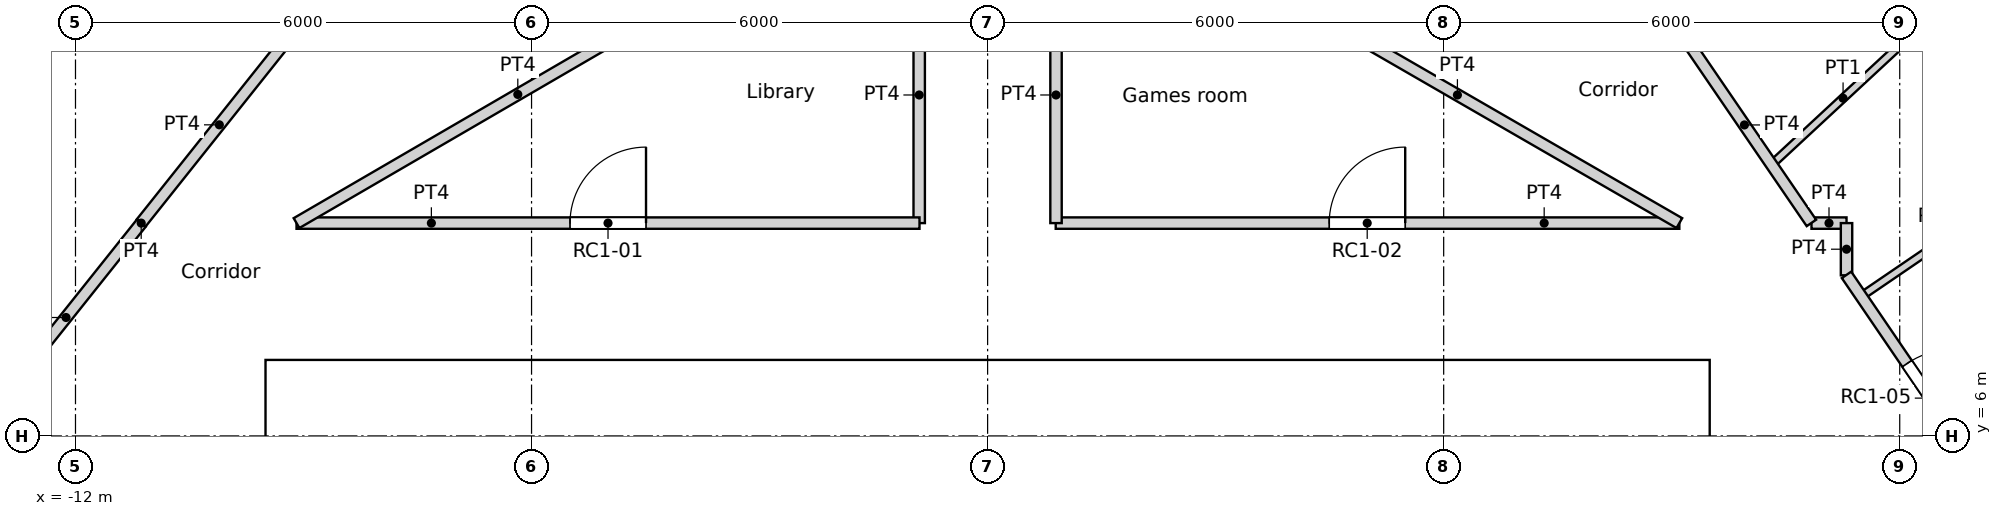
"""IFC4 building model, lengths in metres.
Left out: names, types, materials, properties, quantities, classifications, styles, units other than length and angle.
Written with IfcOpenShell. Run it as: python <this file> out.ifc"""

import sys

from ifc_helpers import new_model, si_unit, direction, frame, frame_2d, origin, place, context, subcontext, project, spatial, rectangle, extrude, element, fill, save


model = new_model("IFC4")
c1 = context("Model", 3, precision=1e-05, world=origin(), true_north=direction((0.0, 1.0)))
c2 = subcontext(c1, "Body", "Model", "MODEL_VIEW")
j1 = project(units=[si_unit("LENGTHUNIT", "METRE"), si_unit("PLANEANGLEUNIT", "RADIAN")], contexts=[c1])
p1 = place(None, origin())
s1 = spatial("IfcSite", under=j1, at=p1, CompositionType="ELEMENT")
p2 = place(p1, origin())
s2 = spatial("IfcBuilding", under=s1, at=p2, CompositionType="ELEMENT")
p3 = place(p2, frame((0.0, 0.0, 231.0)))
s3 = spatial("IfcBuildingStorey", under=s2, at=p3, CompositionType="ELEMENT", Elevation=231.0)
p4 = place(p3, frame((-9.5, 6.7, 0.0), z_axis=(0.0, 0.0, 1.0), x_axis=(1.0, 0.0, 0.0)))
e1 = element("IfcWall", 1, at=p4, inside=s3, PredefinedType="SOLIDWALL", context=c2, shape_type="SweptSolid", body=[
    extrude(rectangle(XDim=19.0, YDim=0.6, at=frame_2d((9.5, 0.0))), origin(), (0.0, 0.0, 1.0), 3.6),
])
p5 = place(p4, frame((5.35, 0.0, 0.0)))
e2 = element("IfcOpeningElement", 2, at=p5, cuts=e1, PredefinedType="OPENING", context=c2, shape_type="SweptSolid", body=[
    extrude(rectangle(XDim=1.7, YDim=2.1, at=frame_2d((0.85, 1.05))), frame((0.0, 0.3, 0.0), z_axis=(0.0, -1.0, 0.0), x_axis=(1.0, 0.0, 0.0)), (0.0, 0.0, 1.0), 0.6),
])
p6 = place(p3, frame((-9.2, -6.4, 0.0), z_axis=(0.0, 0.0, 1.0), x_axis=(0.0, 1.0, 0.0)))
e3 = element("IfcWall", 3, at=p6, inside=s3, PredefinedType="SOLIDWALL", context=c2, shape_type="SweptSolid", body=[
    extrude(rectangle(XDim=12.8, YDim=0.6, at=frame_2d((6.4, 0.0))), origin(), (0.0, 0.0, 1.0), 3.6),
])
p7 = place(p3, frame((9.2, -6.4, 0.0), z_axis=(0.0, 0.0, 1.0), x_axis=(0.0, 1.0, 0.0)))
e4 = element("IfcWall", 4, at=p7, inside=s3, PredefinedType="SOLIDWALL", context=c2, shape_type="SweptSolid", body=[
    extrude(rectangle(XDim=12.8, YDim=0.6, at=frame_2d((6.4, 0.0))), origin(), (0.0, 0.0, 1.0), 3.6),
])
p8 = place(p7, frame((6.4, 0.0, 0.0)))
e5 = element("IfcOpeningElement", 5, at=p8, cuts=e4, PredefinedType="OPENING", context=c2, shape_type="SweptSolid", body=[
    extrude(rectangle(XDim=1.8, YDim=2.1, at=frame_2d((0.9, 1.05))), frame((0.0, 0.3, 0.0), z_axis=(0.0, -1.0, 0.0), x_axis=(1.0, 0.0, 0.0)), (0.0, 0.0, 1.0), 0.6),
])
for number, where, z_axis, x_axis in (
    (6, (-2.25, 3.25, 0.0), (0.0, 0.0, 1.0), (0.0, 1.0, 0.0)),
    (7, (0.55, 3.25, 0.0), (0.0, 0.0, 1.0), (0.0, 1.0, 0.0)),
    (8, (3.35, 3.25, 0.0), (0.0, 0.0, 1.0), (0.0, 1.0, 0.0)),
    (9, (6.15, 3.25, 0.0), (0.0, 0.0, 1.0), (0.0, 1.0, 0.0)),
):
    element("IfcWall", number, at=place(p3, frame(where, z_axis=z_axis, x_axis=x_axis)), inside=s3, PredefinedType="SOLIDWALL", context=c2, shape_type="SweptSolid", body=[
        extrude(rectangle(XDim=3.15, YDim=0.3, at=frame_2d((1.575, 0.0))), origin(), (0.0, 0.0, 1.0), 3.25),
    ])
p9 = place(p3, frame((-9.092, 8.8, 0.0), z_axis=(0.0, 0.0, 1.0), x_axis=(0.864470922103, 0.502682827277, 0.0)))
e10 = element("IfcWall", 10, at=p9, inside=s3, PredefinedType="PARTITIONING", context=c2, shape_type="SweptSolid", body=[
    extrude(rectangle(XDim=6.735, YDim=0.15, at=frame_2d((3.368, 0.0))), origin(), (0.0, 0.0, 1.0), 3.25),
])
p10 = place(p3, frame((-9.092, 8.8, 0.0), z_axis=(0.0, 0.0, 1.0), x_axis=(1.0, 0.0, 0.0)))
e11 = element("IfcWall", 11, at=p10, inside=s3, PredefinedType="PARTITIONING", context=c2, shape_type="SweptSolid", body=[
    extrude(rectangle(XDim=8.196, YDim=0.15, at=frame_2d((4.098, 0.0))), origin(), (0.0, 0.0, 1.0), 3.25),
])
p11 = place(p10, frame((3.598, 0.0, 0.0)))
e12 = element("IfcOpeningElement", 12, at=p11, cuts=e11, PredefinedType="OPENING", context=c2, shape_type="SweptSolid", body=[
    extrude(rectangle(XDim=1.0, YDim=2.04, at=frame_2d((0.5, 1.02))), frame((0.0, 0.075, 0.0), z_axis=(0.0, -1.0, 0.0), x_axis=(1.0, 0.0, 0.0)), (0.0, 0.0, 1.0), 0.15),
])
p12 = place(p3, frame((0.896, 8.8, 0.0), z_axis=(0.0, 0.0, 1.0), x_axis=(1.0, 0.0, 0.0)))
e13 = element("IfcWall", 13, at=p12, inside=s3, PredefinedType="PARTITIONING", context=c2, shape_type="SweptSolid", body=[
    extrude(rectangle(XDim=8.205, YDim=0.15, at=frame_2d((4.102, 0.0))), origin(), (0.0, 0.0, 1.0), 3.25),
])
p13 = place(p12, frame((3.598, 0.0, 0.0)))
e14 = element("IfcOpeningElement", 14, at=p13, cuts=e13, PredefinedType="OPENING", context=c2, shape_type="SweptSolid", body=[
    extrude(rectangle(XDim=1.0, YDim=2.04, at=frame_2d((0.5, 1.02))), frame((0.0, 0.075, 0.0), z_axis=(0.0, -1.0, 0.0), x_axis=(1.0, 0.0, 0.0)), (0.0, 0.0, 1.0), 0.15),
])
p14 = place(p3, frame((9.075, 11.381, 0.0), z_axis=(0.0, 0.0, 1.0), x_axis=(0.564277533473, -0.825585165333, 0.0)))
e15 = element("IfcWall", 15, at=p14, inside=s3, PredefinedType="PARTITIONING", context=c2, shape_type="SweptSolid", body=[
    extrude(rectangle(XDim=3.123, YDim=0.15, at=frame_2d((1.562, 0.0))), origin(), (0.0, 0.0, 1.0), 3.25),
])
p15 = place(p3, frame((10.839, 8.8, 0.0), z_axis=(0.0, 0.0, 1.0), x_axis=(1.0, 0.0, 0.0)))
e16 = element("IfcWall", 16, at=p15, inside=s3, PredefinedType="PARTITIONING", context=c2, shape_type="SweptSolid", body=[
    extrude(rectangle(XDim=0.461, YDim=0.15, at=frame_2d((0.23, 0.0))), origin(), (0.0, 0.0, 1.0), 3.25),
])
p16 = place(p3, frame((11.3, 8.113, 0.0), z_axis=(0.0, 0.0, 1.0), x_axis=(0.0, 1.0, 0.0)))
e17 = element("IfcWall", 17, at=p16, inside=s3, PredefinedType="PARTITIONING", context=c2, shape_type="SweptSolid", body=[
    extrude(rectangle(XDim=0.687, YDim=0.15, at=frame_2d((0.344, 0.0))), origin(), (0.0, 0.0, 1.0), 3.25),
])
p17 = place(p3, frame((-11.134, 8.8, 0.0), z_axis=(0.0, 0.0, 1.0), x_axis=(-1.0, 0.0, 0.0)))
e18 = element("IfcWall", 18, at=p17, inside=s3, PredefinedType="PARTITIONING", context=c2, shape_type="SweptSolid", body=[
    extrude(rectangle(XDim=0.003, YDim=0.15, at=frame_2d((0.001, 0.0))), origin(), (0.0, 0.0, 1.0), 3.25),
])
p18 = place(p3, frame((-11.136, 8.802, 0.0), z_axis=(0.0, 0.0, 1.0), x_axis=(0.623151397235, 0.782101231379, 0.0)))
e19 = element("IfcWall", 19, at=p18, inside=s3, PredefinedType="PARTITIONING", context=c2, shape_type="SweptSolid", body=[
    extrude(rectangle(XDim=3.301, YDim=0.15, at=frame_2d((1.65, 0.0))), origin(), (0.0, 0.0, 1.0), 3.25),
])
p19 = place(p3, frame((11.3, 8.119, 0.0), z_axis=(0.0, 0.0, 1.0), x_axis=(0.56348561488, -0.82612587529, 0.0)))
e20 = element("IfcWall", 20, at=p19, inside=s3, PredefinedType="PARTITIONING", context=c2, shape_type="SweptSolid", body=[
    extrude(rectangle(XDim=4.633, YDim=0.15, at=frame_2d((2.316, 0.0))), origin(), (0.0, 0.0, 1.0), 3.25),
])
p20 = place(p19, frame((1.413, 0.0, 0.0)))
e21 = element("IfcOpeningElement", 21, at=p20, cuts=e20, PredefinedType="OPENING", context=c2, shape_type="SweptSolid", body=[
    extrude(rectangle(XDim=1.1, YDim=2.1, at=frame_2d((0.55, 1.05))), frame((0.0, 0.075, 0.0), z_axis=(0.0, -1.0, 0.0), x_axis=(1.0, 0.0, 0.0)), (0.0, 0.0, 1.0), 0.15),
])
p21 = place(p3, frame((-0.9, 8.8, 0.0), z_axis=(0.0, 0.0, 1.0), x_axis=(0.0, 1.0, 0.0)))
e22 = element("IfcWall", 22, at=p21, inside=s3, PredefinedType="PARTITIONING", context=c2, shape_type="SweptSolid", body=[
    extrude(rectangle(XDim=3.371, YDim=0.15, at=frame_2d((1.686, 0.0))), origin(), (0.0, 0.0, 1.0), 3.25),
])
p22 = place(p3, frame((3.261, 12.171, 0.0), z_axis=(0.0, 0.0, 1.0), x_axis=(0.866066809554, -0.499928276245, 0.0)))
e23 = element("IfcWall", 23, at=p22, inside=s3, PredefinedType="PARTITIONING", context=c2, shape_type="SweptSolid", body=[
    extrude(rectangle(XDim=6.743, YDim=0.15, at=frame_2d((3.371, 0.0))), origin(), (0.0, 0.0, 1.0), 3.25),
])
p23 = place(p3, frame((0.9, 8.8, 0.0), z_axis=(0.0, 0.0, 1.0), x_axis=(0.0, 1.0, 0.0)))
e24 = element("IfcWall", 24, at=p23, inside=s3, PredefinedType="PARTITIONING", context=c2, shape_type="SweptSolid", body=[
    extrude(rectangle(XDim=3.371, YDim=0.15, at=frame_2d((1.686, 0.0))), origin(), (0.0, 0.0, 1.0), 3.25),
])
p24 = place(p3, frame((-13.115, 6.316, 0.0), z_axis=(0.0, 0.0, 1.0), x_axis=(0.623476099415, 0.781842409606, 0.0)))
e25 = element("IfcWall", 25, at=p24, inside=s3, PredefinedType="PARTITIONING", context=c2, shape_type="SweptSolid", body=[
    extrude(rectangle(XDim=3.177, YDim=0.15, at=frame_2d((1.589, 0.0))), origin(), (0.0, 0.0, 1.0), 3.25),
])
p25 = place(p3, frame((11.493, 7.836, 0.0), z_axis=(0.0, 0.0, 1.0), x_axis=(0.826231748746, 0.563330362544, 0.0)))
e26 = element("IfcWall", 26, at=p25, inside=s3, PredefinedType="PARTITIONING", context=c2, shape_type="SweptSolid", body=[
    extrude(rectangle(XDim=5.862, YDim=0.1, at=frame_2d((2.931, 0.0))), origin(), (0.0, 0.0, 1.0), 3.25),
])
p26 = place(p25, frame((2.431, 0.0, 0.0)))
e27 = element("IfcOpeningElement", 27, at=p26, cuts=e26, PredefinedType="OPENING", context=c2, shape_type="SweptSolid", body=[
    extrude(rectangle(XDim=1.0, YDim=2.04, at=frame_2d((0.5, 1.02))), frame((0.0, 0.05, 0.0), z_axis=(0.0, -1.0, 0.0), x_axis=(1.0, 0.0, 0.0)), (0.0, 0.0, 1.0), 0.1),
])
p27 = place(p3, frame((10.312, 9.568, 0.0), z_axis=(0.0, 0.0, 1.0), x_axis=(0.733002312561, 0.680226146057, 0.0)))
e28 = element("IfcWall", 28, at=p27, inside=s3, PredefinedType="PARTITIONING", context=c2, shape_type="SweptSolid", body=[
    extrude(rectangle(XDim=5.704, YDim=0.1, at=frame_2d((2.852, 0.0))), origin(), (0.0, 0.0, 1.0), 3.25),
])
p28 = place(p27, frame((2.622, 0.0, 0.0)))
e29 = element("IfcOpeningElement", 29, at=p28, cuts=e28, PredefinedType="OPENING", context=c2, shape_type="SweptSolid", body=[
    extrude(rectangle(XDim=0.9, YDim=2.1, at=frame_2d((0.45, 1.05))), frame((0.0, 0.05, 0.0), z_axis=(0.0, -1.0, 0.0), x_axis=(1.0, 0.0, 0.0)), (0.0, 0.0, 1.0), 0.1),
])
p29 = place(p5, origin())
e30 = element("IfcDoor", 30, at=p29, inside=s3, OperationType="DOUBLE_DOOR_SINGLE_SWING", PredefinedType="DOOR", context=c2, shape_type="SweptSolid", body=[
    extrude(rectangle(XDim=1.7, YDim=2.1, at=frame_2d((0.85, 1.05))), frame((0.0, 0.025, 0.0), z_axis=(0.0, -1.0, 0.0), x_axis=(1.0, 0.0, 0.0)), (0.0, 0.0, 1.0), 0.05),
])
fill(e2, e30)
p30 = place(p11, origin())
e31 = element("IfcDoor", 31, at=p30, inside=s3, OperationType="SINGLE_SWING_RIGHT", PredefinedType="DOOR", context=c2, shape_type="SweptSolid", body=[
    extrude(rectangle(XDim=1.0, YDim=2.04, at=frame_2d((0.5, 1.02))), frame((0.0, 0.025, 0.0), z_axis=(0.0, -1.0, 0.0), x_axis=(1.0, 0.0, 0.0)), (0.0, 0.0, 1.0), 0.05),
])
fill(e12, e31)
p31 = place(p13, origin())
e32 = element("IfcDoor", 32, at=p31, inside=s3, OperationType="SINGLE_SWING_RIGHT", PredefinedType="DOOR", context=c2, shape_type="SweptSolid", body=[
    extrude(rectangle(XDim=1.0, YDim=2.04, at=frame_2d((0.5, 1.02))), frame((0.0, 0.025, 0.0), z_axis=(0.0, -1.0, 0.0), x_axis=(1.0, 0.0, 0.0)), (0.0, 0.0, 1.0), 0.05),
])
fill(e14, e32)
p32 = place(p20, origin())
e33 = element("IfcDoor", 33, at=p32, inside=s3, OperationType="SINGLE_SWING_RIGHT", PredefinedType="DOOR", context=c2, shape_type="SweptSolid", body=[
    extrude(rectangle(XDim=1.1, YDim=2.1, at=frame_2d((0.55, 1.05))), frame((0.0, 0.025, 0.0), z_axis=(0.0, -1.0, 0.0), x_axis=(1.0, 0.0, 0.0)), (0.0, 0.0, 1.0), 0.05),
])
fill(e21, e33)
save(model, sys.argv[1])
